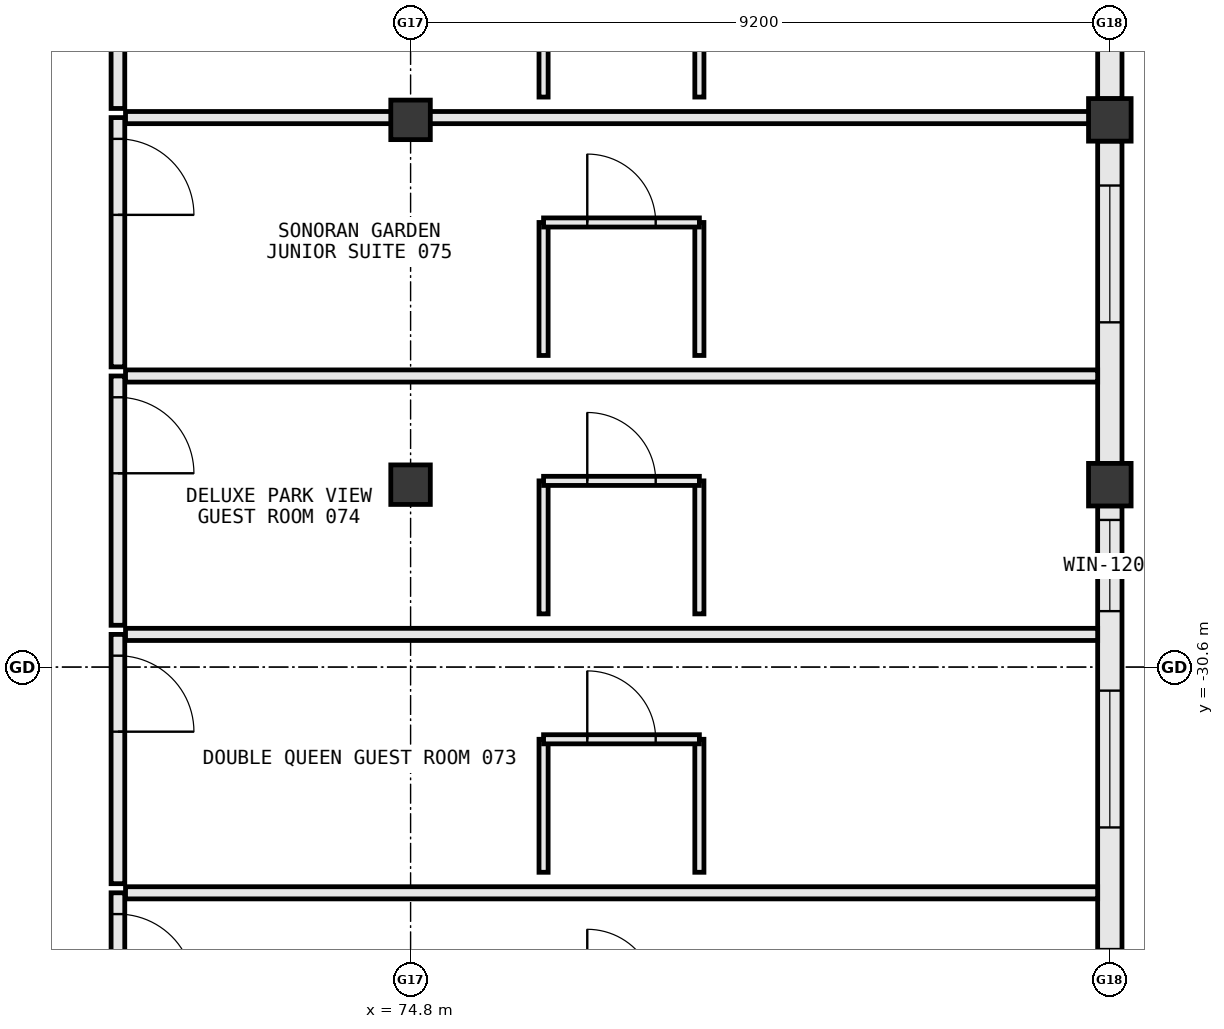
"""IFC4 building model, lengths in metres.
Left out: names, types, materials, properties, quantities, classifications, styles, units other than length and angle.
Written with IfcOpenShell. Run it as: python <this file> out.ifc"""

import sys

from ifc_helpers import new_model, si_unit, direction, frame, frame_2d, origin, origin_2d, place, context, subcontext, project, spatial, rectangle, extrude, element, fill, save


model = new_model("IFC4")
c1 = context("Model", 3, precision=1e-05, world=origin(), true_north=direction((0.0, 1.0)))
c2 = subcontext(c1, "Body", "Model", "MODEL_VIEW")
j1 = project(units=[si_unit("LENGTHUNIT", "METRE"), si_unit("PLANEANGLEUNIT", "RADIAN")], contexts=[c1])
p1 = place(None, origin())
s1 = spatial("IfcSite", under=j1, at=p1, CompositionType="ELEMENT")
p2 = place(p1, origin())
s2 = spatial("IfcBuilding", under=s1, at=p2, CompositionType="ELEMENT")
p3 = place(p2, frame((0.0, 0.0, 16.2)))
s3 = spatial("IfcBuildingStorey", under=s2, at=p3, CompositionType="ELEMENT", Elevation=16.2)
for number, where, z_axis, x_axis in (
    (1, (74.8, -28.2, 0.0), (0.0, 0.0, 1.0), (1.0, 0.0, 0.0)),
    (2, (74.8, -23.4, 0.0), (0.0, 0.0, 1.0), (1.0, 0.0, 0.0)),
):
    element("IfcColumn", number, at=place(p3, frame(where, z_axis=z_axis, x_axis=x_axis)), inside=s3, PredefinedType="COLUMN", context=c2, shape_type="SweptSolid", body=[
        extrude(rectangle(XDim=0.52, YDim=0.52, at=origin_2d()), origin(), (0.0, 0.0, 1.0), 3.8),
    ])
for number, where, z_axis, x_axis in (
    (3, (84.0, -28.2, 0.0), (0.0, 0.0, 1.0), (1.0, 0.0, 0.0)),
    (4, (84.0, -23.4, 0.0), (0.0, 0.0, 1.0), (1.0, 0.0, 0.0)),
):
    element("IfcColumn", number, at=place(p3, frame(where, z_axis=z_axis, x_axis=x_axis)), inside=s3, PredefinedType="COLUMN", context=c2, shape_type="SweptSolid", body=[
        extrude(rectangle(XDim=0.56, YDim=0.56, at=origin_2d()), origin(), (0.0, 0.0, 1.0), 3.8),
    ])
p4 = place(p3, frame((84.0, -37.522, 0.0), z_axis=(0.0, 0.0, 1.0), x_axis=(0.0, 1.0, 0.0)))
e5 = element("IfcWall", 5, at=p4, inside=s3, PredefinedType="STANDARD", context=c2, shape_type="SweptSolid", body=[
    extrude(rectangle(XDim=9.044, YDim=0.32, at=frame_2d((4.522, 0.0))), origin(), (0.0, 0.0, 1.0), 2.975),
])
p5 = place(p4, frame((1.412, 0.0, 0.85)))
e6 = element("IfcOpeningElement", 6, at=p5, cuts=e5, PredefinedType="OPENING", context=c2, shape_type="SweptSolid", body=[
    extrude(rectangle(XDim=1.8, YDim=1.85, at=frame_2d((0.9, 0.925))), frame((0.0, 0.172, 0.0), z_axis=(0.0, -1.0, 0.0), x_axis=(1.0, 0.0, 0.0)), (0.0, 0.0, 1.0), 0.344),
])
p6 = place(p4, frame((4.812, 0.0, 0.85)))
e7 = element("IfcOpeningElement", 7, at=p6, cuts=e5, PredefinedType="OPENING", context=c2, shape_type="SweptSolid", body=[
    extrude(rectangle(XDim=1.8, YDim=1.85, at=frame_2d((0.9, 0.925))), frame((0.0, 0.172, 0.0), z_axis=(0.0, -1.0, 0.0), x_axis=(1.0, 0.0, 0.0)), (0.0, 0.0, 1.0), 0.344),
])
p7 = place(p4, frame((7.658, 0.0, 0.85)))
e8 = element("IfcOpeningElement", 8, at=p7, cuts=e5, PredefinedType="OPENING", context=c2, shape_type="SweptSolid", body=[
    extrude(rectangle(XDim=1.2, YDim=1.55, at=frame_2d((0.6, 0.775))), frame((0.0, 0.172, 0.0), z_axis=(0.0, -1.0, 0.0), x_axis=(1.0, 0.0, 0.0)), (0.0, 0.0, 1.0), 0.344),
])
p8 = place(p3, frame((84.0, -27.922, 0.0), z_axis=(0.0, 0.0, 1.0), x_axis=(0.0, 1.0, 0.0)))
e9 = element("IfcWall", 9, at=p8, inside=s3, PredefinedType="STANDARD", context=c2, shape_type="SweptSolid", body=[
    extrude(rectangle(XDim=4.244, YDim=0.32, at=frame_2d((2.122, 0.0))), origin(), (0.0, 0.0, 1.0), 2.975),
])
p9 = place(p8, frame((1.858, 0.0, 0.85)))
e10 = element("IfcOpeningElement", 10, at=p9, cuts=e9, PredefinedType="OPENING", context=c2, shape_type="SweptSolid", body=[
    extrude(rectangle(XDim=1.8, YDim=1.85, at=frame_2d((0.9, 0.925))), frame((0.0, 0.172, 0.0), z_axis=(0.0, -1.0, 0.0), x_axis=(1.0, 0.0, 0.0)), (0.0, 0.0, 1.0), 0.344),
])
p10 = place(p3, frame((84.0, -23.122, 0.0), z_axis=(0.0, 0.0, 1.0), x_axis=(0.0, 1.0, 0.0)))
e11 = element("IfcWall", 11, at=p10, inside=s3, PredefinedType="STANDARD", context=c2, shape_type="SweptSolid", body=[
    extrude(rectangle(XDim=4.244, YDim=0.32, at=frame_2d((2.122, 0.0))), origin(), (0.0, 0.0, 1.0), 2.975),
])
p11 = place(p10, frame((0.676, 0.0, 0.85)))
e12 = element("IfcOpeningElement", 12, at=p11, cuts=e11, PredefinedType="OPENING", context=c2, shape_type="SweptSolid", body=[
    extrude(rectangle(XDim=1.8, YDim=1.85, at=frame_2d((0.9, 0.925))), frame((0.0, 0.172, 0.0), z_axis=(0.0, -1.0, 0.0), x_axis=(1.0, 0.0, 0.0)), (0.0, 0.0, 1.0), 0.344),
])
p12 = place(p3, frame((70.95, -33.57, 0.0), z_axis=(0.0, 0.0, 1.0), x_axis=(0.0, -1.0, 0.0)))
e13 = element("IfcWall", 13, at=p12, inside=s3, PredefinedType="PARTITIONING", context=c2, shape_type="SweptSolid", body=[
    extrude(rectangle(XDim=3.28, YDim=0.18, at=frame_2d((1.64, 0.0))), origin(), (0.0, 0.0, 1.0), 3.56),
])
p13 = place(p12, frame((0.28, 0.0, 0.0)))
e14 = element("IfcOpeningElement", 14, at=p13, cuts=e13, PredefinedType="OPENING", context=c2, shape_type="SweptSolid", body=[
    extrude(rectangle(XDim=1.0, YDim=2.2, at=frame_2d((0.5, 1.1))), frame((0.0, 0.102, 0.0), z_axis=(0.0, -1.0, 0.0), x_axis=(1.0, 0.0, 0.0)), (0.0, 0.0, 1.0), 0.204),
])
p14 = place(p3, frame((71.05, -33.57, 0.0), z_axis=(0.0, 0.0, 1.0), x_axis=(1.0, 0.0, 0.0)))
e15 = element("IfcWall", 15, at=p14, inside=s3, PredefinedType="PARTITIONING", context=c2, shape_type="SweptSolid", body=[
    extrude(rectangle(XDim=12.79, YDim=0.16, at=frame_2d((6.395, 0.0))), origin(), (0.0, 0.0, 1.0), 3.56),
])
p15 = place(p3, frame((70.95, -30.17, 0.0), z_axis=(0.0, 0.0, 1.0), x_axis=(0.0, -1.0, 0.0)))
e16 = element("IfcWall", 16, at=p15, inside=s3, PredefinedType="PARTITIONING", context=c2, shape_type="SweptSolid", body=[
    extrude(rectangle(XDim=3.28, YDim=0.18, at=frame_2d((1.64, 0.0))), origin(), (0.0, 0.0, 1.0), 3.56),
])
p16 = place(p15, frame((0.28, 0.0, 0.0)))
e17 = element("IfcOpeningElement", 17, at=p16, cuts=e16, PredefinedType="OPENING", context=c2, shape_type="SweptSolid", body=[
    extrude(rectangle(XDim=1.0, YDim=2.2, at=frame_2d((0.5, 1.1))), frame((0.0, 0.102, 0.0), z_axis=(0.0, -1.0, 0.0), x_axis=(1.0, 0.0, 0.0)), (0.0, 0.0, 1.0), 0.204),
])
p17 = place(p3, frame((71.05, -30.17, 0.0), z_axis=(0.0, 0.0, 1.0), x_axis=(1.0, 0.0, 0.0)))
e18 = element("IfcWall", 18, at=p17, inside=s3, PredefinedType="PARTITIONING", context=c2, shape_type="SweptSolid", body=[
    extrude(rectangle(XDim=12.79, YDim=0.16, at=frame_2d((6.395, 0.0))), origin(), (0.0, 0.0, 1.0), 3.56),
])
for number, where, z_axis, x_axis in (
    (19, (76.55, -33.3, 0.0), (0.0, 0.0, 1.0), (0.0, 1.0, 0.0)),
    (20, (78.6, -33.3, 0.0), (0.0, 0.0, 1.0), (0.0, 1.0, 0.0)),
):
    element("IfcWall", number, at=place(p3, frame(where, z_axis=z_axis, x_axis=x_axis)), inside=s3, PredefinedType="PARTITIONING", context=c2, shape_type="SweptSolid", body=[
        extrude(rectangle(XDim=1.75, YDim=0.12, at=frame_2d((0.875, 0.0))), origin(), (0.0, 0.0, 1.0), 3.56),
    ])
p18 = place(p3, frame((76.55, -31.55, 0.0), z_axis=(0.0, 0.0, 1.0), x_axis=(1.0, 0.0, 0.0)))
e21 = element("IfcWall", 21, at=p18, inside=s3, PredefinedType="PARTITIONING", context=c2, shape_type="SweptSolid", body=[
    extrude(rectangle(XDim=2.05, YDim=0.12, at=frame_2d((1.025, 0.0))), origin(), (0.0, 0.0, 1.0), 3.56),
])
p19 = place(p18, frame((0.575, 0.0, 0.0)))
e22 = element("IfcOpeningElement", 22, at=p19, cuts=e21, PredefinedType="OPENING", context=c2, shape_type="SweptSolid", body=[
    extrude(rectangle(XDim=0.9, YDim=2.15, at=frame_2d((0.45, 1.075))), frame((0.0, 0.072, 0.0), z_axis=(0.0, -1.0, 0.0), x_axis=(1.0, 0.0, 0.0)), (0.0, 0.0, 1.0), 0.144),
])
p20 = place(p3, frame((70.95, -26.77, 0.0), z_axis=(0.0, 0.0, 1.0), x_axis=(0.0, -1.0, 0.0)))
e23 = element("IfcWall", 23, at=p20, inside=s3, PredefinedType="PARTITIONING", context=c2, shape_type="SweptSolid", body=[
    extrude(rectangle(XDim=3.28, YDim=0.18, at=frame_2d((1.64, 0.0))), origin(), (0.0, 0.0, 1.0), 3.56),
])
p21 = place(p20, frame((0.28, 0.0, 0.0)))
e24 = element("IfcOpeningElement", 24, at=p21, cuts=e23, PredefinedType="OPENING", context=c2, shape_type="SweptSolid", body=[
    extrude(rectangle(XDim=1.0, YDim=2.2, at=frame_2d((0.5, 1.1))), frame((0.0, 0.102, 0.0), z_axis=(0.0, -1.0, 0.0), x_axis=(1.0, 0.0, 0.0)), (0.0, 0.0, 1.0), 0.204),
])
p22 = place(p3, frame((71.05, -26.77, 0.0), z_axis=(0.0, 0.0, 1.0), x_axis=(1.0, 0.0, 0.0)))
e25 = element("IfcWall", 25, at=p22, inside=s3, PredefinedType="PARTITIONING", context=c2, shape_type="SweptSolid", body=[
    extrude(rectangle(XDim=12.79, YDim=0.16, at=frame_2d((6.395, 0.0))), origin(), (0.0, 0.0, 1.0), 3.56),
])
for number, where, z_axis, x_axis in (
    (26, (76.55, -29.9, 0.0), (0.0, 0.0, 1.0), (0.0, 1.0, 0.0)),
    (27, (78.6, -29.9, 0.0), (0.0, 0.0, 1.0), (0.0, 1.0, 0.0)),
):
    element("IfcWall", number, at=place(p3, frame(where, z_axis=z_axis, x_axis=x_axis)), inside=s3, PredefinedType="PARTITIONING", context=c2, shape_type="SweptSolid", body=[
        extrude(rectangle(XDim=1.75, YDim=0.12, at=frame_2d((0.875, 0.0))), origin(), (0.0, 0.0, 1.0), 3.56),
    ])
p23 = place(p3, frame((76.55, -28.15, 0.0), z_axis=(0.0, 0.0, 1.0), x_axis=(1.0, 0.0, 0.0)))
e28 = element("IfcWall", 28, at=p23, inside=s3, PredefinedType="PARTITIONING", context=c2, shape_type="SweptSolid", body=[
    extrude(rectangle(XDim=2.05, YDim=0.12, at=frame_2d((1.025, 0.0))), origin(), (0.0, 0.0, 1.0), 2.915),
])
p24 = place(p23, frame((0.575, 0.0, 0.0)))
e29 = element("IfcOpeningElement", 29, at=p24, cuts=e28, PredefinedType="OPENING", context=c2, shape_type="SweptSolid", body=[
    extrude(rectangle(XDim=0.9, YDim=2.15, at=frame_2d((0.45, 1.075))), frame((0.0, 0.072, 0.0), z_axis=(0.0, -1.0, 0.0), x_axis=(1.0, 0.0, 0.0)), (0.0, 0.0, 1.0), 0.144),
])
p25 = place(p3, frame((70.95, -23.37, 0.0), z_axis=(0.0, 0.0, 1.0), x_axis=(0.0, -1.0, 0.0)))
e30 = element("IfcWall", 30, at=p25, inside=s3, PredefinedType="PARTITIONING", context=c2, shape_type="SweptSolid", body=[
    extrude(rectangle(XDim=3.28, YDim=0.18, at=frame_2d((1.64, 0.0))), origin(), (0.0, 0.0, 1.0), 3.56),
])
p26 = place(p25, frame((0.28, 0.0, 0.0)))
e31 = element("IfcOpeningElement", 31, at=p26, cuts=e30, PredefinedType="OPENING", context=c2, shape_type="SweptSolid", body=[
    extrude(rectangle(XDim=1.0, YDim=2.2, at=frame_2d((0.5, 1.1))), frame((0.0, 0.102, 0.0), z_axis=(0.0, -1.0, 0.0), x_axis=(1.0, 0.0, 0.0)), (0.0, 0.0, 1.0), 0.204),
])
p27 = place(p3, frame((71.05, -23.37, 0.0), z_axis=(0.0, 0.0, 1.0), x_axis=(1.0, 0.0, 0.0)))
e32 = element("IfcWall", 32, at=p27, inside=s3, PredefinedType="PARTITIONING", context=c2, shape_type="SweptSolid", body=[
    extrude(rectangle(XDim=12.79, YDim=0.16, at=frame_2d((6.395, 0.0))), origin(), (0.0, 0.0, 1.0), 2.695),
])
for number, where, z_axis, x_axis in (
    (33, (76.55, -26.5, 0.0), (0.0, 0.0, 1.0), (0.0, 1.0, 0.0)),
    (34, (78.6, -26.5, 0.0), (0.0, 0.0, 1.0), (0.0, 1.0, 0.0)),
):
    element("IfcWall", number, at=place(p3, frame(where, z_axis=z_axis, x_axis=x_axis)), inside=s3, PredefinedType="PARTITIONING", context=c2, shape_type="SweptSolid", body=[
        extrude(rectangle(XDim=1.75, YDim=0.12, at=frame_2d((0.875, 0.0))), origin(), (0.0, 0.0, 1.0), 3.56),
    ])
p28 = place(p3, frame((76.55, -24.75, 0.0), z_axis=(0.0, 0.0, 1.0), x_axis=(1.0, 0.0, 0.0)))
e35 = element("IfcWall", 35, at=p28, inside=s3, PredefinedType="PARTITIONING", context=c2, shape_type="SweptSolid", body=[
    extrude(rectangle(XDim=2.05, YDim=0.12, at=frame_2d((1.025, 0.0))), origin(), (0.0, 0.0, 1.0), 3.56),
])
p29 = place(p28, frame((0.575, 0.0, 0.0)))
e36 = element("IfcOpeningElement", 36, at=p29, cuts=e35, PredefinedType="OPENING", context=c2, shape_type="SweptSolid", body=[
    extrude(rectangle(XDim=0.9, YDim=2.15, at=frame_2d((0.45, 1.075))), frame((0.0, 0.072, 0.0), z_axis=(0.0, -1.0, 0.0), x_axis=(1.0, 0.0, 0.0)), (0.0, 0.0, 1.0), 0.144),
])
p30 = place(p3, frame((70.95, -19.97, 0.0), z_axis=(0.0, 0.0, 1.0), x_axis=(0.0, -1.0, 0.0)))
e37 = element("IfcWall", 37, at=p30, inside=s3, PredefinedType="PARTITIONING", context=c2, shape_type="SweptSolid", body=[
    extrude(rectangle(XDim=3.28, YDim=0.18, at=frame_2d((1.64, 0.0))), origin(), (0.0, 0.0, 1.0), 3.56),
])
p31 = place(p30, frame((0.28, 0.0, 0.0)))
e38 = element("IfcOpeningElement", 38, at=p31, cuts=e37, PredefinedType="OPENING", context=c2, shape_type="SweptSolid", body=[
    extrude(rectangle(XDim=1.0, YDim=2.2, at=frame_2d((0.5, 1.1))), frame((0.0, 0.102, 0.0), z_axis=(0.0, -1.0, 0.0), x_axis=(1.0, 0.0, 0.0)), (0.0, 0.0, 1.0), 0.204),
])
for number, where, z_axis, x_axis in (
    (39, (76.55, -23.1, 0.0), (0.0, 0.0, 1.0), (0.0, 1.0, 0.0)),
    (40, (78.6, -23.1, 0.0), (0.0, 0.0, 1.0), (0.0, 1.0, 0.0)),
):
    element("IfcWall", number, at=place(p3, frame(where, z_axis=z_axis, x_axis=x_axis)), inside=s3, PredefinedType="PARTITIONING", context=c2, shape_type="SweptSolid", body=[
        extrude(rectangle(XDim=1.75, YDim=0.12, at=frame_2d((0.875, 0.0))), origin(), (0.0, 0.0, 1.0), 3.56),
    ])
p32 = place(p5, origin())
e41 = element("IfcWindow", 41, at=p32, inside=s3, PartitioningType="SINGLE_PANEL", PredefinedType="WINDOW", context=c2, shape_type="SweptSolid", body=[
    extrude(rectangle(XDim=1.8, YDim=1.85, at=frame_2d((0.9, 0.925))), frame((0.0, 0.03, 0.0), z_axis=(0.0, -1.0, 0.0), x_axis=(1.0, 0.0, 0.0)), (0.0, 0.0, 1.0), 0.06),
])
fill(e6, e41)
p33 = place(p6, origin())
e42 = element("IfcWindow", 42, at=p33, inside=s3, PartitioningType="SINGLE_PANEL", PredefinedType="WINDOW", context=c2, shape_type="SweptSolid", body=[
    extrude(rectangle(XDim=1.8, YDim=1.85, at=frame_2d((0.9, 0.925))), frame((0.0, 0.03, 0.0), z_axis=(0.0, -1.0, 0.0), x_axis=(1.0, 0.0, 0.0)), (0.0, 0.0, 1.0), 0.06),
])
fill(e7, e42)
p34 = place(p7, origin())
e43 = element("IfcWindow", 43, at=p34, inside=s3, PartitioningType="SINGLE_PANEL", PredefinedType="WINDOW", context=c2, shape_type="SweptSolid", body=[
    extrude(rectangle(XDim=1.2, YDim=1.55, at=frame_2d((0.6, 0.775))), frame((0.0, 0.03, 0.0), z_axis=(0.0, -1.0, 0.0), x_axis=(1.0, 0.0, 0.0)), (0.0, 0.0, 1.0), 0.06),
])
fill(e8, e43)
p35 = place(p9, origin())
e44 = element("IfcWindow", 44, at=p35, inside=s3, PartitioningType="SINGLE_PANEL", PredefinedType="WINDOW", context=c2, shape_type="SweptSolid", body=[
    extrude(rectangle(XDim=1.8, YDim=1.85, at=frame_2d((0.9, 0.925))), frame((0.0, 0.03, 0.0), z_axis=(0.0, -1.0, 0.0), x_axis=(1.0, 0.0, 0.0)), (0.0, 0.0, 1.0), 0.06),
])
fill(e10, e44)
p36 = place(p13, origin())
e45 = element("IfcDoor", 45, at=p36, inside=s3, OperationType="SINGLE_SWING_RIGHT", PredefinedType="DOOR", context=c2, shape_type="SweptSolid", body=[
    extrude(rectangle(XDim=1.0, YDim=2.2, at=frame_2d((0.5, 1.1))), frame((0.0, 0.025, 0.0), z_axis=(0.0, -1.0, 0.0), x_axis=(1.0, 0.0, 0.0)), (0.0, 0.0, 1.0), 0.05),
])
fill(e14, e45)
p37 = place(p16, origin())
e46 = element("IfcDoor", 46, at=p37, inside=s3, OperationType="SINGLE_SWING_RIGHT", PredefinedType="DOOR", context=c2, shape_type="SweptSolid", body=[
    extrude(rectangle(XDim=1.0, YDim=2.2, at=frame_2d((0.5, 1.1))), frame((0.0, 0.025, 0.0), z_axis=(0.0, -1.0, 0.0), x_axis=(1.0, 0.0, 0.0)), (0.0, 0.0, 1.0), 0.05),
])
fill(e17, e46)
p38 = place(p19, origin())
e47 = element("IfcDoor", 47, at=p38, inside=s3, OperationType="SINGLE_SWING_LEFT", PredefinedType="DOOR", context=c2, shape_type="SweptSolid", body=[
    extrude(rectangle(XDim=0.9, YDim=2.15, at=frame_2d((0.45, 1.075))), frame((0.0, 0.025, 0.0), z_axis=(0.0, -1.0, 0.0), x_axis=(1.0, 0.0, 0.0)), (0.0, 0.0, 1.0), 0.05),
])
fill(e22, e47)
p39 = place(p21, origin())
e48 = element("IfcDoor", 48, at=p39, inside=s3, OperationType="SINGLE_SWING_RIGHT", PredefinedType="DOOR", context=c2, shape_type="SweptSolid", body=[
    extrude(rectangle(XDim=1.0, YDim=2.2, at=frame_2d((0.5, 1.1))), frame((0.0, 0.025, 0.0), z_axis=(0.0, -1.0, 0.0), x_axis=(1.0, 0.0, 0.0)), (0.0, 0.0, 1.0), 0.05),
])
fill(e24, e48)
p40 = place(p24, origin())
e49 = element("IfcDoor", 49, at=p40, inside=s3, OperationType="SINGLE_SWING_LEFT", PredefinedType="DOOR", context=c2, shape_type="SweptSolid", body=[
    extrude(rectangle(XDim=0.9, YDim=2.15, at=frame_2d((0.45, 1.075))), frame((0.0, 0.025, 0.0), z_axis=(0.0, -1.0, 0.0), x_axis=(1.0, 0.0, 0.0)), (0.0, 0.0, 1.0), 0.05),
])
fill(e29, e49)
p41 = place(p26, origin())
e50 = element("IfcDoor", 50, at=p41, inside=s3, OperationType="SINGLE_SWING_RIGHT", PredefinedType="DOOR", context=c2, shape_type="SweptSolid", body=[
    extrude(rectangle(XDim=1.0, YDim=2.2, at=frame_2d((0.5, 1.1))), frame((0.0, 0.025, 0.0), z_axis=(0.0, -1.0, 0.0), x_axis=(1.0, 0.0, 0.0)), (0.0, 0.0, 1.0), 0.05),
])
fill(e31, e50)
p42 = place(p29, origin())
e51 = element("IfcDoor", 51, at=p42, inside=s3, OperationType="SINGLE_SWING_LEFT", PredefinedType="DOOR", context=c2, shape_type="SweptSolid", body=[
    extrude(rectangle(XDim=0.9, YDim=2.15, at=frame_2d((0.45, 1.075))), frame((0.0, 0.025, 0.0), z_axis=(0.0, -1.0, 0.0), x_axis=(1.0, 0.0, 0.0)), (0.0, 0.0, 1.0), 0.05),
])
fill(e36, e51)
save(model, sys.argv[1])
